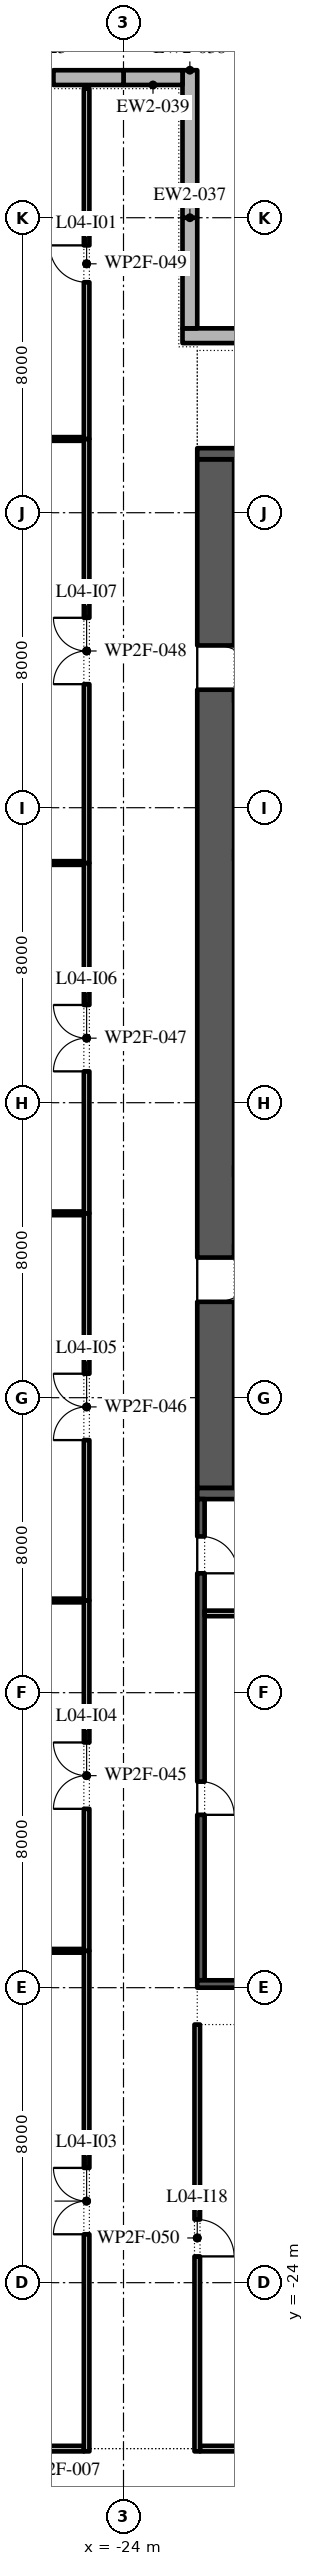
"""IFC4 building model, lengths in metres.
Left out: names, types, materials, properties, quantities, classifications, styles, units other than length and angle.
Written with IfcOpenShell. Run it as: python <this file> out.ifc"""

import sys

from ifc_helpers import new_model, si_unit, direction, frame, frame_2d, origin, place, context, subcontext, project, spatial, polyline, rectangle, outline, extrude, element, fill, save


model = new_model("IFC4")
c1 = context("Model", 3, precision=1e-05, world=origin(), true_north=direction((0.0, 1.0)))
c2 = subcontext(c1, "Body", "Model", "MODEL_VIEW")
j1 = project(units=[si_unit("LENGTHUNIT", "METRE"), si_unit("PLANEANGLEUNIT", "RADIAN")], contexts=[c1])
p1 = place(None, origin())
s1 = spatial("IfcSite", under=j1, at=p1, CompositionType="ELEMENT")
p2 = place(p1, origin())
s2 = spatial("IfcBuilding", under=s1, at=p2, CompositionType="ELEMENT")
p3 = place(p2, frame((0.0, 0.0, 24.0)))
s3 = spatial("IfcBuildingStorey", under=s2, at=p3, CompositionType="ELEMENT", Elevation=24.0)
p4 = place(p3, frame((-16.0, 28.8, 0.0), z_axis=(0.0, 0.0, 1.0), x_axis=(-1.0, 0.0, 0.0)))
e1 = element("IfcWall", 1, at=p4, inside=s3, PredefinedType="STANDARD", context=c2, shape_type="SweptSolid", body=[
    extrude(rectangle(XDim=6.4, YDim=0.4, at=frame_2d((3.2, 0.0))), origin(), (0.0, 0.0, 1.0), 4.5),
])
p5 = place(p3, frame((-22.2, 29.0, 0.0), z_axis=(0.0, 0.0, 1.0), x_axis=(0.0, 1.0, 0.0)))
e2 = element("IfcWall", 2, at=p5, inside=s3, PredefinedType="STANDARD", context=c2, shape_type="SweptSolid", body=[
    extrude(rectangle(XDim=3.0, YDim=0.4, at=frame_2d((1.5, 0.0))), origin(), (0.0, 0.0, 1.0), 4.5),
])
p6 = place(p3, frame((-22.2, 32.0, 0.0), z_axis=(0.0, 0.0, 1.0), x_axis=(0.0, 1.0, 0.0)))
e3 = element("IfcWall", 3, at=p6, inside=s3, PredefinedType="STANDARD", context=c2, shape_type="SweptSolid", body=[
    extrude(rectangle(XDim=4.0, YDim=0.4, at=frame_2d((2.0, 0.0))), origin(), (0.0, 0.0, 1.0), 4.5),
])
p7 = place(p3, frame((-22.4, 35.8, 0.0), z_axis=(0.0, 0.0, 1.0), x_axis=(-1.0, 0.0, 0.0)))
e4 = element("IfcWall", 4, at=p7, inside=s3, PredefinedType="STANDARD", context=c2, shape_type="SweptSolid", body=[
    extrude(rectangle(XDim=1.6, YDim=0.4, at=frame_2d((0.8, 0.0))), origin(), (0.0, 0.0, 1.0), 4.5),
])
p8 = place(p3, frame((-24.0, 35.8, 0.0), z_axis=(0.0, 0.0, 1.0), x_axis=(-1.0, 0.0, 0.0)))
e5 = element("IfcWall", 5, at=p8, inside=s3, PredefinedType="STANDARD", context=c2, shape_type="SweptSolid", body=[
    extrude(rectangle(XDim=8.0, YDim=0.4, at=frame_2d((4.0, 0.0))), origin(), (0.0, 0.0, 1.0), 4.5),
])
p9 = place(p8, frame((1.9, 0.0, 0.9)))
e6 = element("IfcOpeningElement", 6, at=p9, cuts=e5, PredefinedType="OPENING", context=c2, shape_type="SweptSolid", body=[
    extrude(outline(polyline([(0.0, 0.0), (1.8, 0.0), (1.8, 1.5), (1.785, 1.729), (1.738, 1.954), (1.662, 2.17), (1.558, 2.375), (1.427, 2.563), (1.271, 2.732), (1.095, 2.879), (0.9, 3.0), (0.705, 2.879), (0.529, 2.732), (0.373, 2.563), (0.242, 2.375), (0.138, 2.17), (0.062, 1.954), (0.015, 1.729), (0.0, 1.5), (0.0, 0.0)])), frame((0.0, 0.21, 0.0), z_axis=(0.0, -1.0, 0.0), x_axis=(1.0, 0.0, 0.0)), (0.0, 0.0, 1.0), 0.42),
])
p10 = place(p8, frame((4.3, 0.0, 0.9)))
e7 = element("IfcOpeningElement", 7, at=p10, cuts=e5, PredefinedType="OPENING", context=c2, shape_type="SweptSolid", body=[
    extrude(outline(polyline([(0.0, 0.0), (1.8, 0.0), (1.8, 1.5), (1.785, 1.729), (1.738, 1.954), (1.662, 2.17), (1.558, 2.375), (1.427, 2.563), (1.271, 2.732), (1.095, 2.879), (0.9, 3.0), (0.705, 2.879), (0.529, 2.732), (0.373, 2.563), (0.242, 2.375), (0.138, 2.17), (0.062, 1.954), (0.015, 1.729), (0.0, 1.5), (0.0, 0.0)])), frame((0.0, 0.21, 0.0), z_axis=(0.0, -1.0, 0.0), x_axis=(1.0, 0.0, 0.0)), (0.0, 0.0, 1.0), 0.42),
])
p11 = place(p3, frame((-21.5, -2.45, 0.0), z_axis=(0.0, 0.0, 1.0), x_axis=(0.0, 1.0, 0.0)))
e8 = element("IfcWall", 8, at=p11, inside=s3, PredefinedType="SHEAR", context=c2, shape_type="SweptSolid", body=[
    extrude(rectangle(XDim=27.9, YDim=1.0, at=frame_2d((13.95, 0.0))), origin(), (0.0, 0.0, 1.0), 4.5),
])
p12 = place(p11, frame((5.05, 0.0, 0.0)))
e9 = element("IfcOpeningElement", 9, at=p12, cuts=e8, PredefinedType="OPENING", context=c2, shape_type="SweptSolid", body=[
    extrude(rectangle(XDim=1.2, YDim=2.1, at=frame_2d((0.6, 1.05))), frame((0.0, 0.51, 0.0), z_axis=(0.0, -1.0, 0.0), x_axis=(1.0, 0.0, 0.0)), (0.0, 0.0, 1.0), 1.02),
])
p13 = place(p11, frame((21.65, 0.0, 0.0)))
e10 = element("IfcOpeningElement", 10, at=p13, cuts=e8, PredefinedType="OPENING", context=c2, shape_type="SweptSolid", body=[
    extrude(rectangle(XDim=1.2, YDim=2.1, at=frame_2d((0.6, 1.05))), frame((0.0, 0.51, 0.0), z_axis=(0.0, -1.0, 0.0), x_axis=(1.0, 0.0, 0.0)), (0.0, 0.0, 1.0), 1.02),
])
for number, where, z_axis, x_axis in (
    (11, (-22.0, -2.6, 0.0), (0.0, 0.0, 1.0), (1.0, 0.0, 0.0)),
    (12, (-22.0, 25.6, 0.0), (0.0, 0.0, 1.0), (1.0, 0.0, 0.0)),
):
    element("IfcWall", number, at=place(p3, frame(where, z_axis=z_axis, x_axis=x_axis)), inside=s3, PredefinedType="SHEAR", context=c2, shape_type="SweptSolid", body=[
        extrude(rectangle(XDim=12.0, YDim=0.3, at=frame_2d((6.0, 0.0))), origin(), (0.0, 0.0, 1.0), 4.5),
    ])
p14 = place(p3, frame((-21.9, -15.8, 0.0), z_axis=(0.0, 0.0, 1.0), x_axis=(0.0, 1.0, 0.0)))
e13 = element("IfcWall", 13, at=p14, inside=s3, PredefinedType="SHEAR", context=c2, shape_type="SweptSolid", body=[
    extrude(rectangle(XDim=13.05, YDim=0.2, at=frame_2d((6.525, 0.0))), origin(), (0.0, 0.0, 1.0), 4.5),
])
p15 = place(p14, frame((4.488, 0.0, 0.0)))
e14 = element("IfcOpeningElement", 14, at=p15, cuts=e13, PredefinedType="OPENING", context=c2, shape_type="SweptSolid", body=[
    extrude(rectangle(XDim=0.9, YDim=2.1, at=frame_2d((0.45, 1.05))), frame((0.0, 0.11, 0.0), z_axis=(0.0, -1.0, 0.0), x_axis=(1.0, 0.0, 0.0)), (0.0, 0.0, 1.0), 0.22),
])
p16 = place(p14, frame((11.038, 0.0, 0.0)))
e15 = element("IfcOpeningElement", 15, at=p16, cuts=e13, PredefinedType="OPENING", context=c2, shape_type="SweptSolid", body=[
    extrude(rectangle(XDim=1.0, YDim=2.1, at=frame_2d((0.5, 1.05))), frame((0.0, 0.11, 0.0), z_axis=(0.0, -1.0, 0.0), x_axis=(1.0, 0.0, 0.0)), (0.0, 0.0, 1.0), 0.22),
])
p17 = place(p3, frame((-22.0, -15.9, 0.0), z_axis=(0.0, 0.0, 1.0), x_axis=(1.0, 0.0, 0.0)))
e16 = element("IfcWall", 16, at=p17, inside=s3, PredefinedType="SHEAR", context=c2, shape_type="SweptSolid", body=[
    extrude(rectangle(XDim=12.0, YDim=0.2, at=frame_2d((6.0, 0.0))), origin(), (0.0, 0.0, 1.0), 4.5),
])
p18 = place(p3, frame((-21.8, -5.85, 0.0), z_axis=(0.0, 0.0, 1.0), x_axis=(1.0, 0.0, 0.0)))
e17 = element("IfcWall", 17, at=p18, inside=s3, PredefinedType="PARTITIONING", context=c2, shape_type="SweptSolid", body=[
    extrude(rectangle(XDim=5.725, YDim=0.15, at=frame_2d((2.863, 0.0))), origin(), (0.0, 0.0, 1.0), 4.5),
])
p19 = place(p3, frame((-27.0, -28.5, 0.0), z_axis=(0.0, 0.0, 1.0), x_axis=(1.0, 0.0, 0.0)))
e18 = element("IfcWall", 18, at=p19, inside=s3, PredefinedType="PARTITIONING", context=c2, shape_type="SweptSolid", body=[
    extrude(rectangle(XDim=1.925, YDim=0.15, at=frame_2d((0.962, 0.0))), origin(), (0.0, 0.0, 1.0), 4.5),
])
p20 = place(p3, frame((-21.925, -28.5, 0.0), z_axis=(0.0, 0.0, 1.0), x_axis=(1.0, 0.0, 0.0)))
e19 = element("IfcWall", 19, at=p20, inside=s3, PredefinedType="PARTITIONING", context=c2, shape_type="SweptSolid", body=[
    extrude(rectangle(XDim=11.525, YDim=0.15, at=frame_2d((5.763, 0.0))), origin(), (0.0, 0.0, 1.0), 4.5),
])
p21 = place(p3, frame((-41.5, -15.0, 0.0), z_axis=(0.0, 0.0, 1.0), x_axis=(1.0, 0.0, 0.0)))
e20 = element("IfcWall", 20, at=p21, inside=s3, PredefinedType="PARTITIONING", context=c2, shape_type="SweptSolid", body=[
    extrude(rectangle(XDim=16.425, YDim=0.1, at=frame_2d((8.212, 0.0))), origin(), (0.0, 0.0, 1.0), 4.5),
])
p22 = place(p3, frame((-43.5, -5.5, 0.0), z_axis=(0.0, 0.0, 1.0), x_axis=(1.0, 0.0, 0.0)))
e21 = element("IfcWall", 21, at=p22, inside=s3, PredefinedType="PARTITIONING", context=c2, shape_type="SweptSolid", body=[
    extrude(rectangle(XDim=18.425, YDim=0.1, at=frame_2d((9.212, 0.0))), origin(), (0.0, 0.0, 1.0), 4.5),
])
p23 = place(p3, frame((-31.7, 5.0, 0.0), z_axis=(0.0, 0.0, 1.0), x_axis=(1.0, 0.0, 0.0)))
e22 = element("IfcWall", 22, at=p23, inside=s3, PredefinedType="PARTITIONING", context=c2, shape_type="SweptSolid", body=[
    extrude(rectangle(XDim=6.625, YDim=0.1, at=frame_2d((3.312, 0.0))), origin(), (0.0, 0.0, 1.0), 4.5),
])
p24 = place(p3, frame((-43.5, 14.5, 0.0), z_axis=(0.0, 0.0, 1.0), x_axis=(1.0, 0.0, 0.0)))
e23 = element("IfcWall", 23, at=p24, inside=s3, PredefinedType="PARTITIONING", context=c2, shape_type="SweptSolid", body=[
    extrude(rectangle(XDim=18.425, YDim=0.1, at=frame_2d((9.212, 0.0))), origin(), (0.0, 0.0, 1.0), 4.5),
])
p25 = place(p3, frame((-34.0, 26.0, 0.0), z_axis=(0.0, 0.0, 1.0), x_axis=(1.0, 0.0, 0.0)))
e24 = element("IfcWall", 24, at=p25, inside=s3, PredefinedType="PARTITIONING", context=c2, shape_type="SweptSolid", body=[
    extrude(rectangle(XDim=8.925, YDim=0.1, at=frame_2d((4.462, 0.0))), origin(), (0.0, 0.0, 1.0), 4.5),
])
p26 = place(p3, frame((-25.0, -28.575, 0.0), z_axis=(0.0, 0.0, 1.0), x_axis=(0.0, 1.0, 0.0)))
e25 = element("IfcWall", 25, at=p26, inside=s3, PredefinedType="PARTITIONING", context=c2, shape_type="SweptSolid", body=[
    extrude(rectangle(XDim=13.575, YDim=0.15, at=frame_2d((6.788, 0.0))), origin(), (0.0, 0.0, 1.0), 4.5),
])
p27 = place(p26, frame((5.887, 0.0, 0.0)))
e26 = element("IfcOpeningElement", 26, at=p27, cuts=e25, PredefinedType="OPENING", context=c2, shape_type="SweptSolid", body=[
    extrude(rectangle(XDim=1.8, YDim=2.1, at=frame_2d((0.9, 1.05))), frame((0.0, 0.085, 0.0), z_axis=(0.0, -1.0, 0.0), x_axis=(1.0, 0.0, 0.0)), (0.0, 0.0, 1.0), 0.17),
])
p28 = place(p3, frame((-25.0, -15.0, 0.0), z_axis=(0.0, 0.0, 1.0), x_axis=(0.0, 1.0, 0.0)))
e27 = element("IfcWall", 27, at=p28, inside=s3, PredefinedType="PARTITIONING", context=c2, shape_type="SweptSolid", body=[
    extrude(rectangle(XDim=9.5, YDim=0.15, at=frame_2d((4.75, 0.0))), origin(), (0.0, 0.0, 1.0), 4.5),
])
p29 = place(p28, frame((3.85, 0.0, 0.0)))
e28 = element("IfcOpeningElement", 28, at=p29, cuts=e27, PredefinedType="OPENING", context=c2, shape_type="SweptSolid", body=[
    extrude(rectangle(XDim=1.8, YDim=2.1, at=frame_2d((0.9, 1.05))), frame((0.0, 0.085, 0.0), z_axis=(0.0, -1.0, 0.0), x_axis=(1.0, 0.0, 0.0)), (0.0, 0.0, 1.0), 0.17),
])
p30 = place(p3, frame((-25.0, -5.5, 0.0), z_axis=(0.0, 0.0, 1.0), x_axis=(0.0, 1.0, 0.0)))
e29 = element("IfcWall", 29, at=p30, inside=s3, PredefinedType="PARTITIONING", context=c2, shape_type="SweptSolid", body=[
    extrude(rectangle(XDim=10.5, YDim=0.15, at=frame_2d((5.25, 0.0))), origin(), (0.0, 0.0, 1.0), 4.5),
])
p31 = place(p30, frame((4.35, 0.0, 0.0)))
e30 = element("IfcOpeningElement", 30, at=p31, cuts=e29, PredefinedType="OPENING", context=c2, shape_type="SweptSolid", body=[
    extrude(rectangle(XDim=1.8, YDim=2.1, at=frame_2d((0.9, 1.05))), frame((0.0, 0.085, 0.0), z_axis=(0.0, -1.0, 0.0), x_axis=(1.0, 0.0, 0.0)), (0.0, 0.0, 1.0), 0.17),
])
p32 = place(p3, frame((-25.0, 5.0, 0.0), z_axis=(0.0, 0.0, 1.0), x_axis=(0.0, 1.0, 0.0)))
e31 = element("IfcWall", 31, at=p32, inside=s3, PredefinedType="PARTITIONING", context=c2, shape_type="SweptSolid", body=[
    extrude(rectangle(XDim=9.5, YDim=0.15, at=frame_2d((4.75, 0.0))), origin(), (0.0, 0.0, 1.0), 4.5),
])
p33 = place(p32, frame((3.85, 0.0, 0.0)))
e32 = element("IfcOpeningElement", 32, at=p33, cuts=e31, PredefinedType="OPENING", context=c2, shape_type="SweptSolid", body=[
    extrude(rectangle(XDim=1.8, YDim=2.1, at=frame_2d((0.9, 1.05))), frame((0.0, 0.085, 0.0), z_axis=(0.0, -1.0, 0.0), x_axis=(1.0, 0.0, 0.0)), (0.0, 0.0, 1.0), 0.17),
])
p34 = place(p3, frame((-25.0, 14.5, 0.0), z_axis=(0.0, 0.0, 1.0), x_axis=(0.0, 1.0, 0.0)))
e33 = element("IfcWall", 33, at=p34, inside=s3, PredefinedType="PARTITIONING", context=c2, shape_type="SweptSolid", body=[
    extrude(rectangle(XDim=11.5, YDim=0.15, at=frame_2d((5.75, 0.0))), origin(), (0.0, 0.0, 1.0), 4.5),
])
p35 = place(p34, frame((4.85, 0.0, 0.0)))
e34 = element("IfcOpeningElement", 34, at=p35, cuts=e33, PredefinedType="OPENING", context=c2, shape_type="SweptSolid", body=[
    extrude(rectangle(XDim=1.8, YDim=2.1, at=frame_2d((0.9, 1.05))), frame((0.0, 0.085, 0.0), z_axis=(0.0, -1.0, 0.0), x_axis=(1.0, 0.0, 0.0)), (0.0, 0.0, 1.0), 0.17),
])
p36 = place(p3, frame((-25.0, 26.0, 0.0), z_axis=(0.0, 0.0, 1.0), x_axis=(0.0, 1.0, 0.0)))
e35 = element("IfcWall", 35, at=p36, inside=s3, PredefinedType="PARTITIONING", context=c2, shape_type="SweptSolid", body=[
    extrude(rectangle(XDim=9.5, YDim=0.15, at=frame_2d((4.75, 0.0))), origin(), (0.0, 0.0, 1.0), 4.5),
])
p37 = place(p36, frame((4.25, 0.0, 0.0)))
e36 = element("IfcOpeningElement", 36, at=p37, cuts=e35, PredefinedType="OPENING", context=c2, shape_type="SweptSolid", body=[
    extrude(rectangle(XDim=1.0, YDim=2.1, at=frame_2d((0.5, 1.05))), frame((0.0, 0.085, 0.0), z_axis=(0.0, -1.0, 0.0), x_axis=(1.0, 0.0, 0.0)), (0.0, 0.0, 1.0), 0.17),
])
p38 = place(p3, frame((-22.0, -28.575, 0.0), z_axis=(0.0, 0.0, 1.0), x_axis=(0.0, 1.0, 0.0)))
e37 = element("IfcWall", 37, at=p38, inside=s3, PredefinedType="PARTITIONING", context=c2, shape_type="SweptSolid", body=[
    extrude(rectangle(XDim=11.575, YDim=0.15, at=frame_2d((5.788, 0.0))), origin(), (0.0, 0.0, 1.0), 4.5),
])
p39 = place(p38, frame((5.288, 0.0, 0.0)))
e38 = element("IfcOpeningElement", 38, at=p39, cuts=e37, PredefinedType="OPENING", context=c2, shape_type="SweptSolid", body=[
    extrude(rectangle(XDim=1.0, YDim=2.1, at=frame_2d((0.5, 1.05))), frame((0.0, 0.085, 0.0), z_axis=(0.0, -1.0, 0.0), x_axis=(1.0, 0.0, 0.0)), (0.0, 0.0, 1.0), 0.17),
])
p40 = place(p9, origin())
e39 = element("IfcWindow", 39, at=p40, inside=s3, PartitioningType="DOUBLE_PANEL_VERTICAL", PredefinedType="WINDOW", context=c2, shape_type="SweptSolid", body=[
    extrude(outline(polyline([(0.0, 0.0), (1.8, 0.0), (1.8, 1.5), (1.785, 1.729), (1.738, 1.954), (1.662, 2.17), (1.558, 2.375), (1.427, 2.563), (1.271, 2.732), (1.095, 2.879), (0.9, 3.0), (0.705, 2.879), (0.529, 2.732), (0.373, 2.563), (0.242, 2.375), (0.138, 2.17), (0.062, 1.954), (0.015, 1.729), (0.0, 1.5), (0.0, 0.0)])), frame((0.0, 0.03, 0.0), z_axis=(0.0, -1.0, 0.0), x_axis=(1.0, 0.0, 0.0)), (0.0, 0.0, 1.0), 0.06),
])
fill(e6, e39)
p41 = place(p12, frame((1.2, 0.0, 0.0), z_axis=(0.0, 0.0, 1.0), x_axis=(-1.0, 0.0, 0.0)))
e40 = element("IfcDoor", 40, at=p41, inside=s3, OperationType="SINGLE_SWING_RIGHT", PredefinedType="DOOR", context=c2, shape_type="SweptSolid", body=[
    extrude(rectangle(XDim=1.2, YDim=2.1, at=frame_2d((0.6, 1.05))), frame((0.0, 0.025, 0.0), z_axis=(0.0, -1.0, 0.0), x_axis=(1.0, 0.0, 0.0)), (0.0, 0.0, 1.0), 0.05),
])
fill(e9, e40)
p42 = place(p13, frame((1.2, 0.0, 0.0), z_axis=(0.0, 0.0, 1.0), x_axis=(-1.0, 0.0, 0.0)))
e41 = element("IfcDoor", 41, at=p42, inside=s3, OperationType="SINGLE_SWING_LEFT", PredefinedType="DOOR", context=c2, shape_type="SweptSolid", body=[
    extrude(rectangle(XDim=1.2, YDim=2.1, at=frame_2d((0.6, 1.05))), frame((0.0, 0.025, 0.0), z_axis=(0.0, -1.0, 0.0), x_axis=(1.0, 0.0, 0.0)), (0.0, 0.0, 1.0), 0.05),
])
fill(e10, e41)
p43 = place(p15, frame((0.9, -0.15, 0.0), z_axis=(0.0, 0.0, 1.0), x_axis=(-1.0, 0.0, 0.0)))
e42 = element("IfcDoor", 42, at=p43, inside=s3, OperationType="SINGLE_SWING_LEFT", PredefinedType="DOOR", context=c2, shape_type="SweptSolid", body=[
    extrude(rectangle(XDim=0.9, YDim=2.1, at=frame_2d((0.45, 1.05))), frame((0.0, -0.05, 0.0), z_axis=(0.0, -1.0, 0.0), x_axis=(1.0, 0.0, 0.0)), (0.0, 0.0, 1.0), 0.05),
])
fill(e14, e42)
p44 = place(p16, frame((1.0, -0.15, 0.0), z_axis=(0.0, 0.0, 1.0), x_axis=(-1.0, 0.0, 0.0)))
e43 = element("IfcDoor", 43, at=p44, inside=s3, OperationType="SINGLE_SWING_LEFT", PredefinedType="DOOR", context=c2, shape_type="SweptSolid", body=[
    extrude(rectangle(XDim=1.0, YDim=2.1, at=frame_2d((0.5, 1.05))), frame((0.0, -0.05, 0.0), z_axis=(0.0, -1.0, 0.0), x_axis=(1.0, 0.0, 0.0)), (0.0, 0.0, 1.0), 0.05),
])
fill(e15, e43)
p45 = place(p37, origin())
e44 = element("IfcDoor", 44, at=p45, inside=s3, OperationType="SINGLE_SWING_LEFT", PredefinedType="DOOR", context=c2, shape_type="SweptSolid", body=[
    extrude(rectangle(XDim=1.0, YDim=2.1, at=frame_2d((0.5, 1.05))), frame((0.0, 0.025, 0.0), z_axis=(0.0, -1.0, 0.0), x_axis=(1.0, 0.0, 0.0)), (0.0, 0.0, 1.0), 0.05),
])
fill(e36, e44)
p46 = place(p27, origin())
e45 = element("IfcDoor", 45, at=p46, inside=s3, OperationType="SINGLE_SWING_LEFT", PredefinedType="DOOR", context=c2, shape_type="SweptSolid", body=[
    extrude(rectangle(XDim=1.8, YDim=2.1, at=frame_2d((0.9, 1.05))), frame((0.0, 0.025, 0.0), z_axis=(0.0, -1.0, 0.0), x_axis=(1.0, 0.0, 0.0)), (0.0, 0.0, 1.0), 0.05),
])
fill(e26, e45)
p47 = place(p29, origin())
e46 = element("IfcDoor", 46, at=p47, inside=s3, OperationType="SINGLE_SWING_RIGHT", PredefinedType="DOOR", context=c2, shape_type="SweptSolid", body=[
    extrude(rectangle(XDim=1.8, YDim=2.1, at=frame_2d((0.9, 1.05))), frame((0.0, 0.025, 0.0), z_axis=(0.0, -1.0, 0.0), x_axis=(1.0, 0.0, 0.0)), (0.0, 0.0, 1.0), 0.05),
])
fill(e28, e46)
p48 = place(p31, origin())
e47 = element("IfcDoor", 47, at=p48, inside=s3, OperationType="SINGLE_SWING_RIGHT", PredefinedType="DOOR", context=c2, shape_type="SweptSolid", body=[
    extrude(rectangle(XDim=1.8, YDim=2.1, at=frame_2d((0.9, 1.05))), frame((0.0, 0.025, 0.0), z_axis=(0.0, -1.0, 0.0), x_axis=(1.0, 0.0, 0.0)), (0.0, 0.0, 1.0), 0.05),
])
fill(e30, e47)
p49 = place(p33, origin())
e48 = element("IfcDoor", 48, at=p49, inside=s3, OperationType="SINGLE_SWING_RIGHT", PredefinedType="DOOR", context=c2, shape_type="SweptSolid", body=[
    extrude(rectangle(XDim=1.8, YDim=2.1, at=frame_2d((0.9, 1.05))), frame((0.0, 0.025, 0.0), z_axis=(0.0, -1.0, 0.0), x_axis=(1.0, 0.0, 0.0)), (0.0, 0.0, 1.0), 0.05),
])
fill(e32, e48)
p50 = place(p35, origin())
e49 = element("IfcDoor", 49, at=p50, inside=s3, OperationType="SINGLE_SWING_RIGHT", PredefinedType="DOOR", context=c2, shape_type="SweptSolid", body=[
    extrude(rectangle(XDim=1.8, YDim=2.1, at=frame_2d((0.9, 1.05))), frame((0.0, 0.025, 0.0), z_axis=(0.0, -1.0, 0.0), x_axis=(1.0, 0.0, 0.0)), (0.0, 0.0, 1.0), 0.05),
])
fill(e34, e49)
p51 = place(p39, frame((1.0, 0.0, 0.0), z_axis=(0.0, 0.0, 1.0), x_axis=(-1.0, 0.0, 0.0)))
e50 = element("IfcDoor", 50, at=p51, inside=s3, OperationType="SINGLE_SWING_LEFT", PredefinedType="DOOR", context=c2, shape_type="SweptSolid", body=[
    extrude(rectangle(XDim=1.0, YDim=2.1, at=frame_2d((0.5, 1.05))), frame((0.0, 0.025, 0.0), z_axis=(0.0, -1.0, 0.0), x_axis=(1.0, 0.0, 0.0)), (0.0, 0.0, 1.0), 0.05),
])
fill(e38, e50)
save(model, sys.argv[1])
